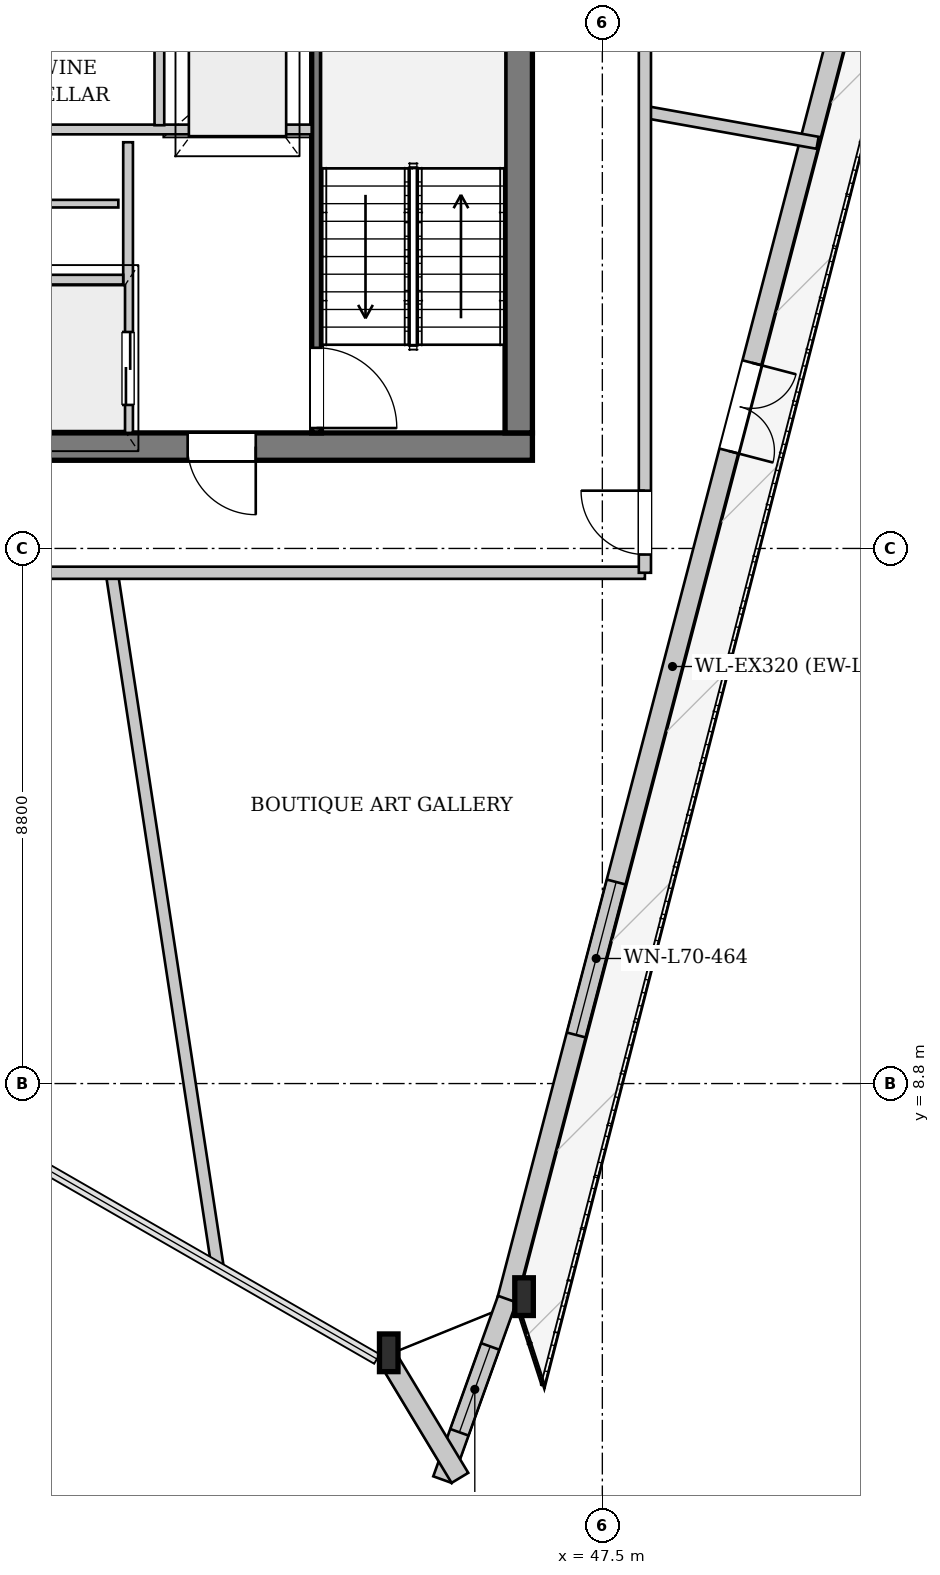
"""IFC4 building model, lengths in metres.
Left out: names, types, materials, properties, quantities, classifications, styles, units other than length and angle.
Written with IfcOpenShell. Run it as: python <this file> out.ifc"""

import sys

from ifc_helpers import new_model, si_unit, direction, frame, frame_2d, origin, origin_2d, place, context, subcontext, project, spatial, rectangle, i_section, extrude, source, transform, mapped, element, fill, save


model = new_model("IFC4")
c1 = context("Model", 3, precision=1e-05, world=origin(), true_north=direction((0.0, 1.0)))
c2 = subcontext(c1, "Body", "Model", "MODEL_VIEW")
j1 = project(units=[si_unit("LENGTHUNIT", "METRE"), si_unit("PLANEANGLEUNIT", "RADIAN")], contexts=[c1])
p1 = place(None, origin())
s1 = spatial("IfcSite", under=j1, at=p1, CompositionType="ELEMENT")
p2 = place(p1, origin())
s2 = spatial("IfcBuilding", under=s1, at=p2, CompositionType="ELEMENT")
p3 = place(p2, frame((0.0, 0.0, 263.3)))
s3 = spatial("IfcBuildingStorey", under=s2, at=p3, CompositionType="ELEMENT", Elevation=263.3)
m1 = source(origin(), c2, "Body", "SweptSolid", [
    extrude(i_section(OverallWidth=0.305, OverallDepth=0.62, WebThickness=0.021, FlangeThickness=0.04, at=origin_2d()), origin(), (0.0, 0.0, 1.0), 3.463),
])
p4 = place(p3, frame((43.792, 4.271, 0.0), z_axis=(0.112445909673, 0.05872566944, 0.99192097122), x_axis=(-0.462926824203, 0.886396500125, 0.0)))
e1 = element("IfcColumn", 1, at=p4, inside=s3, PredefinedType="COLUMN", context=c2, shape_type="MappedRepresentation", body=[
    mapped(m1, transform((0.0, 0.0, 0.0), x_axis=(1.0, 0.0, 0.0), y_axis=(0.0, 1.0, 0.0), z_axis=(0.0, 0.0, 1.0), scale=1.0)),
])
m2 = source(origin(), c2, "Body", "SweptSolid", [
    extrude(i_section(OverallWidth=0.305, OverallDepth=0.62, WebThickness=0.021, FlangeThickness=0.04, at=origin_2d()), origin(), (0.0, 0.0, 1.0), 3.449),
])
p5 = place(p3, frame((46.086, 5.202, 0.0), z_axis=(0.07360549053, 0.054496372796, 0.995797357456), x_axis=(-0.595042724126, 0.80369406895, 0.0)))
e2 = element("IfcColumn", 2, at=p5, inside=s3, PredefinedType="COLUMN", context=c2, shape_type="MappedRepresentation", body=[
    mapped(m2, transform((0.0, 0.0, 0.0), x_axis=(1.0, 0.0, 0.0), y_axis=(0.0, 1.0, 0.0), z_axis=(0.0, 0.0, 1.0), scale=1.0)),
])
p6 = place(p3, frame((51.577, 26.839, 0.0), z_axis=(0.0, 0.0, 1.0), x_axis=(-0.252928525252, -0.967484966867, 0.0)))
e3 = element("IfcWall", 3, at=p6, inside=s3, PredefinedType="SOLIDWALL", context=c2, shape_type="SweptSolid", body=[
    extrude(rectangle(XDim=22.323, YDim=0.32, at=frame_2d((11.161, 0.0))), origin(), (0.0, 0.0, 1.0), 2.872),
])
p7 = place(p6, frame((6.393, 0.0, 0.0)))
e4 = element("IfcOpeningElement", 4, at=p7, cuts=e3, PredefinedType="OPENING", context=c2, shape_type="SweptSolid", body=[
    extrude(rectangle(XDim=1.5, YDim=2.3, at=frame_2d((0.75, 1.15))), frame((0.0, 0.17, 0.0), z_axis=(0.0, -1.0, 0.0), x_axis=(1.0, 0.0, 0.0)), (0.0, 0.0, 1.0), 0.34),
])
p8 = place(p6, frame((15.219, 0.0, 0.402)))
e5 = element("IfcOpeningElement", 5, at=p8, cuts=e3, PredefinedType="OPENING", context=c2, shape_type="SweptSolid", body=[
    extrude(rectangle(XDim=2.6, YDim=2.35, at=frame_2d((1.3, 1.175))), frame((0.0, 0.17, 0.0), z_axis=(0.0, -1.0, 0.0), x_axis=(1.0, 0.0, 0.0)), (0.0, 0.0, 1.0), 0.34),
])
p9 = place(p3, frame((45.935, 5.256, 0.0), z_axis=(0.0, 0.0, 1.0), x_axis=(-0.337650240758, -0.941271647781, 0.0)))
e6 = element("IfcWall", 6, at=p9, inside=s3, PredefinedType="SOLIDWALL", context=c2, shape_type="SweptSolid", body=[
    extrude(rectangle(XDim=3.154, YDim=0.32, at=frame_2d((1.577, 0.0))), origin(), (0.0, 0.0, 1.0), 2.872),
])
p10 = place(p9, frame((0.827, 0.0, 0.452)))
e7 = element("IfcOpeningElement", 7, at=p10, cuts=e6, PredefinedType="OPENING", context=c2, shape_type="SweptSolid", body=[
    extrude(rectangle(XDim=1.5, YDim=2.3, at=frame_2d((0.75, 1.15))), frame((0.0, 0.17, 0.0), z_axis=(0.0, -1.0, 0.0), x_axis=(1.0, 0.0, 0.0)), (0.0, 0.0, 1.0), 0.34),
])
p11 = place(p3, frame((45.158, 2.315, 0.0), z_axis=(0.0, 0.0, 1.0), x_axis=(-0.516260260774, 0.856431750431, 0.0)))
e8 = element("IfcWall", 8, at=p11, inside=s3, PredefinedType="SOLIDWALL", context=c2, shape_type="SweptSolid", body=[
    extrude(rectangle(XDim=2.379, YDim=0.32, at=frame_2d((1.189, 0.0))), origin(), (0.0, 0.0, 1.0), 2.872),
])
p12 = place(p3, frame((46.35, 19.275, 0.0), z_axis=(0.0, 0.0, 1.0), x_axis=(-1.0, 0.0, 0.0)))
e9 = element("IfcWall", 9, at=p12, inside=s3, PredefinedType="SHEAR", context=c2, shape_type="SweptSolid", body=[
    extrude(rectangle(XDim=16.7, YDim=0.45, at=frame_2d((8.35, 0.0))), origin(), (0.0, 0.0, 1.0), 3.38),
])
p13 = place(p12, frame((4.55, 0.0, 0.0)))
e10 = element("IfcOpeningElement", 10, at=p13, cuts=e9, PredefinedType="OPENING", context=c2, shape_type="SweptSolid", body=[
    extrude(rectangle(XDim=1.12, YDim=2.25, at=frame_2d((0.56, 1.125))), frame((0.0, 0.235, 0.0), z_axis=(0.0, -1.0, 0.0), x_axis=(1.0, 0.0, 0.0)), (0.0, 0.0, 1.0), 0.47),
])
p14 = place(p12, frame((11.05, 0.0, 0.0)))
e11 = element("IfcOpeningElement", 11, at=p14, cuts=e9, PredefinedType="OPENING", context=c2, shape_type="SweptSolid", body=[
    extrude(rectangle(XDim=1.12, YDim=2.25, at=frame_2d((0.56, 1.125))), frame((0.0, 0.235, 0.0), z_axis=(0.0, -1.0, 0.0), x_axis=(1.0, 0.0, 0.0)), (0.0, 0.0, 1.0), 0.47),
])
p15 = place(p3, frame((46.125, 33.7, 0.0), z_axis=(0.0, 0.0, 1.0), x_axis=(0.0, -1.0, 0.0)))
e12 = element("IfcWall", 12, at=p15, inside=s3, PredefinedType="SHEAR", context=c2, shape_type="SweptSolid", body=[
    extrude(rectangle(XDim=14.2, YDim=0.45, at=frame_2d((7.1, 0.0))), origin(), (0.0, 0.0, 1.0), 3.38),
])
p16 = place(p15, frame((5.18, 0.0, 0.0)))
e13 = element("IfcOpeningElement", 13, at=p16, cuts=e12, PredefinedType="OPENING", context=c2, shape_type="SweptSolid", body=[
    extrude(rectangle(XDim=1.6, YDim=2.2, at=frame_2d((0.8, 1.1))), frame((0.0, 0.235, 0.0), z_axis=(0.0, -1.0, 0.0), x_axis=(1.0, 0.0, 0.0)), (0.0, 0.0, 1.0), 0.47),
])
p17 = place(p15, frame((2.05, 0.0, 0.0)))
e14 = element("IfcOpeningElement", 14, at=p17, cuts=e12, PredefinedType="OPENING", context=c2, shape_type="SweptSolid", body=[
    extrude(rectangle(XDim=0.95, YDim=2.1, at=frame_2d((0.475, 1.05))), frame((0.0, 0.235, 0.0), z_axis=(0.0, -1.0, 0.0), x_axis=(1.0, 0.0, 0.0)), (0.0, 0.0, 1.0), 0.47),
])
p18 = place(p3, frame((42.8, 26.96, 0.0), z_axis=(0.0, 0.0, 1.0), x_axis=(0.0, -1.0, 0.0)))
e15 = element("IfcWall", 15, at=p18, inside=s3, PredefinedType="PARTITIONING", context=c2, shape_type="SweptSolid", body=[
    extrude(rectangle(XDim=7.46, YDim=0.16, at=frame_2d((3.73, 0.0))), origin(), (0.0, 0.0, 1.0), 3.38),
])
p19 = place(p18, frame((6.06, 0.0, 0.0)))
e16 = element("IfcOpeningElement", 16, at=p19, cuts=e15, PredefinedType="OPENING", context=c2, shape_type="SweptSolid", body=[
    extrude(rectangle(XDim=1.32, YDim=2.2, at=frame_2d((0.66, 1.1))), frame((0.0, 0.09, 0.0), z_axis=(0.0, -1.0, 0.0), x_axis=(1.0, 0.0, 0.0)), (0.0, 0.0, 1.0), 0.18),
])
p20 = place(p3, frame((39.7, 24.28, 0.0), z_axis=(0.0, 0.0, 1.0), x_axis=(0.0, -1.0, 0.0)))
e17 = element("IfcWall", 17, at=p20, inside=s3, PredefinedType="PARTITIONING", context=c2, shape_type="SweptSolid", body=[
    extrude(rectangle(XDim=4.78, YDim=0.16, at=frame_2d((2.39, 0.0))), origin(), (0.0, 0.0, 1.0), 3.38),
])
p21 = place(p20, frame((3.12, 0.0, 0.0)))
e18 = element("IfcOpeningElement", 18, at=p21, cuts=e17, PredefinedType="OPENING", context=c2, shape_type="SweptSolid", body=[
    extrude(rectangle(XDim=1.2, YDim=2.2, at=frame_2d((0.6, 1.1))), frame((0.0, 0.09, 0.0), z_axis=(0.0, -1.0, 0.0), x_axis=(1.0, 0.0, 0.0)), (0.0, 0.0, 1.0), 0.18),
])
p22 = place(p3, frame((36.38, 22.02, 0.0), z_axis=(0.0, 0.0, 1.0), x_axis=(1.0, 0.0, 0.0)))
e19 = element("IfcWall", 19, at=p22, inside=s3, PredefinedType="PARTITIONING", context=c2, shape_type="SweptSolid", body=[
    extrude(rectangle(XDim=3.24, YDim=0.16, at=frame_2d((1.62, 0.0))), origin(), (0.0, 0.0, 1.0), 3.38),
])
p23 = place(p3, frame((33.28, 24.49, 0.0), z_axis=(0.0, 0.0, 1.0), x_axis=(1.0, 0.0, 0.0)))
e20 = element("IfcWall", 20, at=p23, inside=s3, PredefinedType="PARTITIONING", context=c2, shape_type="SweptSolid", body=[
    extrude(rectangle(XDim=9.44, YDim=0.16, at=frame_2d((4.72, 0.0))), origin(), (0.0, 0.0, 1.0), 3.38),
])
p24 = place(p3, frame((36.46, 23.27, 0.0), z_axis=(0.0, 0.0, 1.0), x_axis=(1.0, 0.0, 0.0)))
e21 = element("IfcWall", 21, at=p24, inside=s3, PredefinedType="PARTITIONING", context=c2, shape_type="SweptSolid", body=[
    extrude(rectangle(XDim=3.08, YDim=0.125, at=frame_2d((1.54, 0.0))), origin(), (0.0, 0.0, 1.0), 3.38),
])
p25 = place(p24, frame((1.05, 0.0, 0.0)))
e22 = element("IfcOpeningElement", 22, at=p25, cuts=e21, PredefinedType="OPENING", context=c2, shape_type="SweptSolid", body=[
    extrude(rectangle(XDim=0.9, YDim=2.1, at=frame_2d((0.45, 1.05))), frame((0.0, 0.073, 0.0), z_axis=(0.0, -1.0, 0.0), x_axis=(1.0, 0.0, 0.0)), (0.0, 0.0, 1.0), 0.145),
])
p26 = place(p3, frame((40.215, 24.56, 0.0), z_axis=(0.0, 0.0, 1.0), x_axis=(0.0, 1.0, 0.0)))
e23 = element("IfcWall", 23, at=p26, inside=s3, PredefinedType="PARTITIONING", context=c2, shape_type="SweptSolid", body=[
    extrude(rectangle(XDim=2.31, YDim=0.16, at=frame_2d((1.155, 0.0))), origin(), (0.0, 0.0, 1.0), 3.38),
])
p27 = place(p3, frame((39.433, 17.2, 0.0), z_axis=(0.0, 0.0, 1.0), x_axis=(0.150639275807, -0.98858879651, 0.0)))
e24 = element("IfcWall", 24, at=p27, inside=s3, PredefinedType="PARTITIONING", context=c2, shape_type="SweptSolid", body=[
    extrude(rectangle(XDim=11.517, YDim=0.2, at=frame_2d((5.758, 0.0))), origin(), (0.0, 0.0, 1.0), 3.38),
])
p28 = place(p3, frame((48.2, 24.778, 0.0), z_axis=(0.0, 0.0, 1.0), x_axis=(0.984415019737, -0.175860936298, 0.0)))
e25 = element("IfcWall", 25, at=p28, inside=s3, PredefinedType="PARTITIONING", context=c2, shape_type="SweptSolid", body=[
    extrude(rectangle(XDim=2.885, YDim=0.2, at=frame_2d((1.442, 0.0))), origin(), (0.0, 0.0, 1.0), 3.38),
])
p29 = place(p3, frame((27.8, 17.2, 0.0), z_axis=(0.0, 0.0, 1.0), x_axis=(1.0, 0.0, 0.0)))
e26 = element("IfcWall", 26, at=p29, inside=s3, PredefinedType="PARTITIONING", context=c2, shape_type="SweptSolid", body=[
    extrude(rectangle(XDim=20.4, YDim=0.2, at=frame_2d((10.2, 0.0))), origin(), (0.0, 0.0, 1.0), 3.38),
])
p30 = place(p29, frame((4.91, 0.0, 0.0)))
e27 = element("IfcOpeningElement", 27, at=p30, cuts=e26, PredefinedType="OPENING", context=c2, shape_type="SweptSolid", body=[
    extrude(rectangle(XDim=1.05, YDim=2.2, at=frame_2d((0.525, 1.1))), frame((0.0, 0.11, 0.0), z_axis=(0.0, -1.0, 0.0), x_axis=(1.0, 0.0, 0.0)), (0.0, 0.0, 1.0), 0.22),
])
p31 = place(p3, frame((48.2, 17.2, 0.0), z_axis=(0.0, 0.0, 1.0), x_axis=(0.0, 1.0, 0.0)))
e28 = element("IfcWall", 28, at=p31, inside=s3, PredefinedType="PARTITIONING", context=c2, shape_type="SweptSolid", body=[
    extrude(rectangle(XDim=18.8, YDim=0.2, at=frame_2d((9.4, 0.0))), origin(), (0.0, 0.0, 1.0), 3.005),
])
p32 = place(p31, frame((0.3, 0.0, 0.0)))
e29 = element("IfcOpeningElement", 29, at=p32, cuts=e28, PredefinedType="OPENING", context=c2, shape_type="SweptSolid", body=[
    extrude(rectangle(XDim=1.05, YDim=2.2, at=frame_2d((0.525, 1.1))), frame((0.0, 0.11, 0.0), z_axis=(0.0, -1.0, 0.0), x_axis=(1.0, 0.0, 0.0)), (0.0, 0.0, 1.0), 0.22),
])
p33 = place(p31, frame((13.705, 0.0, 0.0)))
e30 = element("IfcOpeningElement", 30, at=p33, cuts=e28, PredefinedType="OPENING", context=c2, shape_type="SweptSolid", body=[
    extrude(rectangle(XDim=1.05, YDim=2.2, at=frame_2d((0.525, 1.1))), frame((0.0, 0.11, 0.0), z_axis=(0.0, -1.0, 0.0), x_axis=(1.0, 0.0, 0.0)), (0.0, 0.0, 1.0), 0.22),
])
m3 = source(origin(), c2, "Body", "SweptSolid", [
    extrude(rectangle(XDim=1.5, YDim=2.3, at=frame_2d((0.75, 1.15))), frame((0.0, 0.025, 0.0), z_axis=(0.0, -1.0, 0.0), x_axis=(1.0, 0.0, 0.0)), (0.0, 0.0, 1.0), 0.05),
])
p34 = place(p7, origin())
e31 = element("IfcDoor", 31, at=p34, inside=s3, OperationType="DOUBLE_DOOR_SINGLE_SWING", PredefinedType="DOOR", context=c2, shape_type="MappedRepresentation", body=[
    mapped(m3, transform((0.0, 0.0, 0.0), x_axis=(1.0, 0.0, 0.0), y_axis=(0.0, 1.0, 0.0), z_axis=(0.0, 0.0, 1.0), scale=1.0)),
])
fill(e4, e31)
m4 = source(origin(), c2, "Body", "SweptSolid", [
    extrude(rectangle(XDim=2.6, YDim=2.35, at=frame_2d((1.3, 1.175))), frame((0.0, 0.03, 0.0), z_axis=(0.0, -1.0, 0.0), x_axis=(1.0, 0.0, 0.0)), (0.0, 0.0, 1.0), 0.06),
])
p35 = place(p8, origin())
e32 = element("IfcWindow", 32, at=p35, inside=s3, PartitioningType="SINGLE_PANEL", PredefinedType="WINDOW", context=c2, shape_type="MappedRepresentation", body=[
    mapped(m4, transform((0.0, 0.0, 0.0), x_axis=(1.0, 0.0, 0.0), y_axis=(0.0, 1.0, 0.0), z_axis=(0.0, 0.0, 1.0), scale=1.0)),
])
fill(e5, e32)
m5 = source(origin(), c2, "Body", "SweptSolid", [
    extrude(rectangle(XDim=1.5, YDim=2.3, at=frame_2d((0.75, 1.15))), frame((0.0, 0.03, 0.0), z_axis=(0.0, -1.0, 0.0), x_axis=(1.0, 0.0, 0.0)), (0.0, 0.0, 1.0), 0.06),
])
p36 = place(p10, origin())
e33 = element("IfcWindow", 33, at=p36, inside=s3, PartitioningType="SINGLE_PANEL", PredefinedType="WINDOW", context=c2, shape_type="MappedRepresentation", body=[
    mapped(m5, transform((0.0, 0.0, 0.0), x_axis=(1.0, 0.0, 0.0), y_axis=(0.0, 1.0, 0.0), z_axis=(0.0, 0.0, 1.0), scale=1.0)),
])
fill(e7, e33)
m6 = source(origin(), c2, "Body", "SweptSolid", [
    extrude(rectangle(XDim=1.12, YDim=2.25, at=frame_2d((0.56, 1.125))), frame((0.0, 0.025, 0.0), z_axis=(0.0, -1.0, 0.0), x_axis=(1.0, 0.0, 0.0)), (0.0, 0.0, 1.0), 0.05),
])
p37 = place(p13, origin())
e34 = element("IfcDoor", 34, at=p37, inside=s3, OperationType="SINGLE_SWING_LEFT", PredefinedType="DOOR", context=c2, shape_type="MappedRepresentation", body=[
    mapped(m6, transform((0.0, 0.0, 0.0), x_axis=(1.0, 0.0, 0.0), y_axis=(0.0, 1.0, 0.0), z_axis=(0.0, 0.0, 1.0), scale=1.0)),
])
fill(e10, e34)
m7 = source(origin(), c2, "Body", "SweptSolid", [
    extrude(rectangle(XDim=1.32, YDim=2.2, at=frame_2d((0.66, 1.1))), frame((0.0, 0.025, 0.0), z_axis=(0.0, -1.0, 0.0), x_axis=(1.0, 0.0, 0.0)), (0.0, 0.0, 1.0), 0.05),
])
p38 = place(p19, origin())
e35 = element("IfcDoor", 35, at=p38, inside=s3, OperationType="SINGLE_SWING_RIGHT", PredefinedType="DOOR", context=c2, shape_type="MappedRepresentation", body=[
    mapped(m7, transform((0.0, 0.0, 0.0), x_axis=(1.0, 0.0, 0.0), y_axis=(0.0, 1.0, 0.0), z_axis=(0.0, 0.0, 1.0), scale=1.0)),
])
fill(e16, e35)
m8 = source(origin(), c2, "Body", "SweptSolid", [
    extrude(rectangle(XDim=1.2, YDim=2.2, at=frame_2d((0.6, 1.1))), frame((0.0, 0.025, 0.0), z_axis=(0.0, -1.0, 0.0), x_axis=(1.0, 0.0, 0.0)), (0.0, 0.0, 1.0), 0.05),
])
p39 = place(p21, origin())
e36 = element("IfcDoor", 36, at=p39, inside=s3, OperationType="DOUBLE_DOOR_SLIDING", PredefinedType="DOOR", context=c2, shape_type="MappedRepresentation", body=[
    mapped(m8, transform((0.0, 0.0, 0.0), x_axis=(1.0, 0.0, 0.0), y_axis=(0.0, 1.0, 0.0), z_axis=(0.0, 0.0, 1.0), scale=1.0)),
])
fill(e18, e36)
m9 = source(origin(), c2, "Body", "SweptSolid", [
    extrude(rectangle(XDim=1.05, YDim=2.2, at=frame_2d((0.525, 1.1))), frame((0.0, 0.025, 0.0), z_axis=(0.0, -1.0, 0.0), x_axis=(1.0, 0.0, 0.0)), (0.0, 0.0, 1.0), 0.05),
])
p40 = place(p32, origin())
e37 = element("IfcDoor", 37, at=p40, inside=s3, OperationType="SINGLE_SWING_RIGHT", PredefinedType="DOOR", context=c2, shape_type="MappedRepresentation", body=[
    mapped(m9, transform((0.0, 0.0, 0.0), x_axis=(1.0, 0.0, 0.0), y_axis=(0.0, 1.0, 0.0), z_axis=(0.0, 0.0, 1.0), scale=1.0)),
])
fill(e29, e37)
save(model, sys.argv[1])
